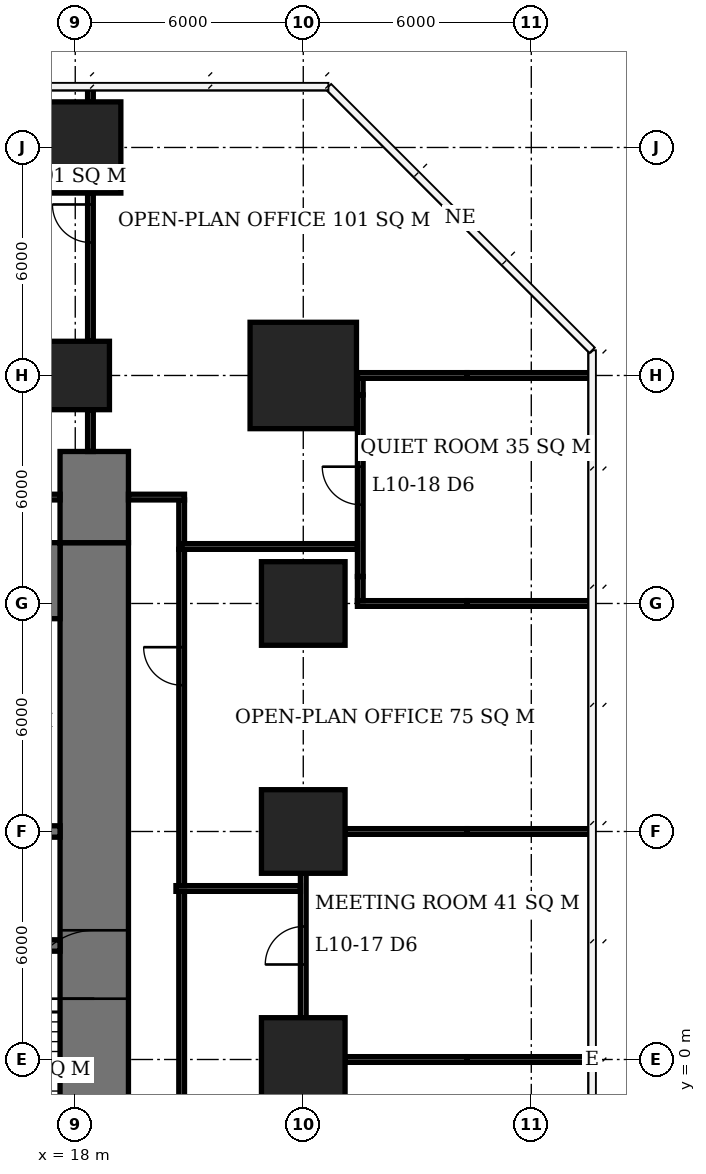
"""IFC4 building model, lengths in metres.
Left out: names, types, materials, properties, quantities, classifications, styles, units other than length and angle.
Written with IfcOpenShell. Run it as: python <this file> out.ifc"""

import sys

from ifc_helpers import new_model, si_unit, direction, frame, frame_2d, origin, origin_2d, place, context, subcontext, project, spatial, rectangle, extrude, element, fill, save


model = new_model("IFC4")
c1 = context("Model", 3, precision=1e-05, world=origin(), true_north=direction((0.0, 1.0)))
c2 = subcontext(c1, "Body", "Model", "MODEL_VIEW")
j1 = project(units=[si_unit("LENGTHUNIT", "METRE"), si_unit("PLANEANGLEUNIT", "RADIAN")], contexts=[c1])
p1 = place(None, origin())
s1 = spatial("IfcSite", under=j1, at=p1, CompositionType="ELEMENT")
p2 = place(p1, origin())
s2 = spatial("IfcBuilding", under=s1, at=p2, CompositionType="ELEMENT")
p3 = place(p2, frame((0.0, 0.0, 45.5)))
s3 = spatial("IfcBuildingStorey", under=s2, at=p3, CompositionType="ELEMENT", Elevation=45.5)
p4 = place(p3, frame((18.0, 18.0, 0.0), z_axis=(0.0, 0.0, 1.0), x_axis=(1.0, 0.0, 0.0)))
e1 = element("IfcColumn", 1, at=p4, inside=s3, PredefinedType="COLUMN", context=c2, shape_type="SweptSolid", body=[
    extrude(rectangle(XDim=1.8, YDim=1.8, at=origin_2d()), origin(), (0.0, 0.0, 1.0), 3.9),
])
p5 = place(p3, frame((18.0, 24.0, 0.0), z_axis=(0.0, 0.0, 1.0), x_axis=(1.0, 0.0, 0.0)))
e2 = element("IfcColumn", 2, at=p5, inside=s3, PredefinedType="COLUMN", context=c2, shape_type="SweptSolid", body=[
    extrude(rectangle(XDim=2.4, YDim=2.4, at=origin_2d()), origin(), (0.0, 0.0, 1.0), 3.9),
])
for number, where, z_axis, x_axis in (
    (3, (24.0, 0.0, 0.0), (0.0, 0.0, 1.0), (1.0, 0.0, 0.0)),
    (4, (24.0, 6.0, 0.0), (0.0, 0.0, 1.0), (1.0, 0.0, 0.0)),
    (5, (24.0, 12.0, 0.0), (0.0, 0.0, 1.0), (1.0, 0.0, 0.0)),
):
    element("IfcColumn", number, at=place(p3, frame(where, z_axis=z_axis, x_axis=x_axis)), inside=s3, PredefinedType="COLUMN", context=c2, shape_type="SweptSolid", body=[
        extrude(rectangle(XDim=2.2, YDim=2.2, at=origin_2d()), origin(), (0.0, 0.0, 1.0), 3.9),
    ])
p6 = place(p3, frame((24.0, 18.0, 0.0), z_axis=(0.0, 0.0, 1.0), x_axis=(1.0, 0.0, 0.0)))
e6 = element("IfcColumn", 6, at=p6, inside=s3, PredefinedType="COLUMN", context=c2, shape_type="SweptSolid", body=[
    extrude(rectangle(XDim=2.8, YDim=2.8, at=origin_2d()), origin(), (0.0, 0.0, 1.0), 3.9),
])
p7 = place(p3, frame((-5.6, 12.6, 0.0), z_axis=(0.0, 0.0, 1.0), x_axis=(1.0, 0.0, 0.0)))
e7 = element("IfcWall", 7, at=p7, inside=s3, PredefinedType="SHEAR", context=c2, shape_type="SweptSolid", body=[
    extrude(rectangle(XDim=23.2, YDim=2.0, at=frame_2d((11.6, 0.0))), origin(), (0.0, 0.0, 1.0), 3.9),
])
p8 = place(p3, frame((18.5, -7.6, 0.0), z_axis=(0.0, 0.0, 1.0), x_axis=(0.0, 1.0, 0.0)))
e8 = element("IfcWall", 8, at=p8, inside=s3, PredefinedType="SHEAR", context=c2, shape_type="SweptSolid", body=[
    extrude(rectangle(XDim=21.2, YDim=1.8, at=frame_2d((10.6, 0.0))), origin(), (0.0, 0.0, 1.0), 3.9),
])
p9 = place(p8, frame((9.2, 0.0, 0.0)))
e9 = element("IfcOpeningElement", 9, at=p9, cuts=e8, PredefinedType="OPENING", context=c2, shape_type="SweptSolid", body=[
    extrude(rectangle(XDim=1.8, YDim=2.4, at=frame_2d((0.9, 1.2))), frame((0.0, 0.91, 0.0), z_axis=(0.0, -1.0, 0.0), x_axis=(1.0, 0.0, 0.0)), (0.0, 0.0, 1.0), 1.82),
])
p10 = place(p3, frame((18.5, 13.6, 0.0), z_axis=(0.0, 0.0, 1.0), x_axis=(0.0, 1.0, 0.0)))
e10 = element("IfcWall", 10, at=p10, inside=s3, PredefinedType="SHEAR", context=c2, shape_type="SweptSolid", body=[
    extrude(rectangle(XDim=2.4, YDim=1.8, at=frame_2d((1.2, 0.0))), origin(), (0.0, 0.0, 1.0), 3.9),
])
p11 = place(p3, frame((12.15, 3.0, 0.0), z_axis=(0.0, 0.0, 1.0), x_axis=(1.0, 0.0, 0.0)))
e11 = element("IfcWall", 11, at=p11, inside=s3, PredefinedType="SHEAR", context=c2, shape_type="SweptSolid", body=[
    extrude(rectangle(XDim=5.45, YDim=0.3, at=frame_2d((2.725, 0.0))), origin(), (0.0, 0.0, 1.0), 3.9),
])
p12 = place(p11, frame((3.25, 0.0, 0.0)))
e12 = element("IfcOpeningElement", 12, at=p12, cuts=e11, PredefinedType="OPENING", context=c2, shape_type="SweptSolid", body=[
    extrude(rectangle(XDim=1.2, YDim=2.1, at=frame_2d((0.6, 1.05))), frame((0.0, 0.16, 0.0), z_axis=(0.0, -1.0, 0.0), x_axis=(1.0, 0.0, 0.0)), (0.0, 0.0, 1.0), 0.32),
])
p13 = place(p11, frame((0.45, 0.0, 0.0)))
e13 = element("IfcOpeningElement", 13, at=p13, cuts=e11, PredefinedType="OPENING", context=c2, shape_type="SweptSolid", body=[
    extrude(rectangle(XDim=0.9, YDim=2.1, at=frame_2d((0.45, 1.05))), frame((0.0, 0.16, 0.0), z_axis=(0.0, -1.0, 0.0), x_axis=(1.0, 0.0, 0.0)), (0.0, 0.0, 1.0), 0.32),
])
p14 = place(p3, frame((-0.15, 6.0, 0.0), z_axis=(0.0, 0.0, 1.0), x_axis=(1.0, 0.0, 0.0)))
e14 = element("IfcWall", 14, at=p14, inside=s3, PredefinedType="SHEAR", context=c2, shape_type="SweptSolid", body=[
    extrude(rectangle(XDim=17.75, YDim=0.3, at=frame_2d((8.875, 0.0))), origin(), (0.0, 0.0, 1.0), 3.9),
])
p15 = place(p14, frame((13.15, 0.0, 0.0)))
e15 = element("IfcOpeningElement", 15, at=p15, cuts=e14, PredefinedType="OPENING", context=c2, shape_type="SweptSolid", body=[
    extrude(rectangle(XDim=0.9, YDim=2.1, at=frame_2d((0.45, 1.05))), frame((0.0, 0.16, 0.0), z_axis=(0.0, -1.0, 0.0), x_axis=(1.0, 0.0, 0.0)), (0.0, 0.0, 1.0), 0.32),
])
p16 = place(p14, frame((1.1, 0.0, 0.0)))
e16 = element("IfcOpeningElement", 16, at=p16, cuts=e14, PredefinedType="OPENING", context=c2, shape_type="SweptSolid", body=[
    extrude(rectangle(XDim=1.1, YDim=2.1, at=frame_2d((0.55, 1.05))), frame((0.0, 0.16, 0.0), z_axis=(0.0, -1.0, 0.0), x_axis=(1.0, 0.0, 0.0)), (0.0, 0.0, 1.0), 0.32),
])
p17 = place(p14, frame((4.1, 0.0, 0.0)))
e17 = element("IfcOpeningElement", 17, at=p17, cuts=e14, PredefinedType="OPENING", context=c2, shape_type="SweptSolid", body=[
    extrude(rectangle(XDim=1.1, YDim=2.1, at=frame_2d((0.55, 1.05))), frame((0.0, 0.16, 0.0), z_axis=(0.0, -1.0, 0.0), x_axis=(1.0, 0.0, 0.0)), (0.0, 0.0, 1.0), 0.32),
])
p18 = place(p14, frame((7.1, 0.0, 0.0)))
e18 = element("IfcOpeningElement", 18, at=p18, cuts=e14, PredefinedType="OPENING", context=c2, shape_type="SweptSolid", body=[
    extrude(rectangle(XDim=1.1, YDim=2.1, at=frame_2d((0.55, 1.05))), frame((0.0, 0.16, 0.0), z_axis=(0.0, -1.0, 0.0), x_axis=(1.0, 0.0, 0.0)), (0.0, 0.0, 1.0), 0.32),
])
p19 = place(p14, frame((10.1, 0.0, 0.0)))
e19 = element("IfcOpeningElement", 19, at=p19, cuts=e14, PredefinedType="OPENING", context=c2, shape_type="SweptSolid", body=[
    extrude(rectangle(XDim=1.1, YDim=2.1, at=frame_2d((0.55, 1.05))), frame((0.0, 0.16, 0.0), z_axis=(0.0, -1.0, 0.0), x_axis=(1.0, 0.0, 0.0)), (0.0, 0.0, 1.0), 0.32),
])
p20 = place(p3, frame((25.1, 0.0, 0.0), z_axis=(0.0, 0.0, 1.0), x_axis=(1.0, 0.0, 0.0)))
e20 = element("IfcWall", 20, at=p20, inside=s3, PredefinedType="PARTITIONING", context=c2, shape_type="SweptSolid", body=[
    extrude(rectangle(XDim=3.21, YDim=0.15, at=frame_2d((1.605, 0.0))), origin(), (0.0, 0.0, 1.0), 2.65),
])
p21 = place(p3, frame((28.31, 0.0, 0.0), z_axis=(0.0, 0.0, 1.0), x_axis=(1.0, 0.0, 0.0)))
e21 = element("IfcWall", 21, at=p21, inside=s3, PredefinedType="PARTITIONING", context=c2, shape_type="SweptSolid", body=[
    extrude(rectangle(XDim=3.24, YDim=0.15, at=frame_2d((1.62, 0.0))), origin(), (0.0, 0.0, 1.0), 3.65),
])
p22 = place(p3, frame((25.1, 6.0, 0.0), z_axis=(0.0, 0.0, 1.0), x_axis=(1.0, 0.0, 0.0)))
e22 = element("IfcWall", 22, at=p22, inside=s3, PredefinedType="PARTITIONING", context=c2, shape_type="SweptSolid", body=[
    extrude(rectangle(XDim=3.21, YDim=0.15, at=frame_2d((1.605, 0.0))), origin(), (0.0, 0.0, 1.0), 2.65),
])
p23 = place(p3, frame((28.31, 6.0, 0.0), z_axis=(0.0, 0.0, 1.0), x_axis=(1.0, 0.0, 0.0)))
e23 = element("IfcWall", 23, at=p23, inside=s3, PredefinedType="PARTITIONING", context=c2, shape_type="SweptSolid", body=[
    extrude(rectangle(XDim=3.29, YDim=0.15, at=frame_2d((1.645, 0.0))), origin(), (0.0, 0.0, 1.0), 3.65),
])
p24 = place(p3, frame((25.425, 12.0, 0.0), z_axis=(0.0, 0.0, 1.0), x_axis=(1.0, 0.0, 0.0)))
e24 = element("IfcWall", 24, at=p24, inside=s3, PredefinedType="PARTITIONING", context=c2, shape_type="SweptSolid", body=[
    extrude(rectangle(XDim=2.885, YDim=0.15, at=frame_2d((1.442, 0.0))), origin(), (0.0, 0.0, 1.0), 2.65),
])
p25 = place(p3, frame((28.31, 12.0, 0.0), z_axis=(0.0, 0.0, 1.0), x_axis=(1.0, 0.0, 0.0)))
e25 = element("IfcWall", 25, at=p25, inside=s3, PredefinedType="PARTITIONING", context=c2, shape_type="SweptSolid", body=[
    extrude(rectangle(XDim=3.29, YDim=0.15, at=frame_2d((1.645, 0.0))), origin(), (0.0, 0.0, 1.0), 3.65),
])
p26 = place(p3, frame((25.425, 18.0, 0.0), z_axis=(0.0, 0.0, 1.0), x_axis=(1.0, 0.0, 0.0)))
e26 = element("IfcWall", 26, at=p26, inside=s3, PredefinedType="PARTITIONING", context=c2, shape_type="SweptSolid", body=[
    extrude(rectangle(XDim=2.885, YDim=0.15, at=frame_2d((1.442, 0.0))), origin(), (0.0, 0.0, 1.0), 2.65),
])
p27 = place(p3, frame((28.31, 18.0, 0.0), z_axis=(0.0, 0.0, 1.0), x_axis=(1.0, 0.0, 0.0)))
e27 = element("IfcWall", 27, at=p27, inside=s3, PredefinedType="PARTITIONING", context=c2, shape_type="SweptSolid", body=[
    extrude(rectangle(XDim=3.29, YDim=0.15, at=frame_2d((1.645, 0.0))), origin(), (0.0, 0.0, 1.0), 3.65),
])
p28 = place(p3, frame((24.0, 1.1, 0.0), z_axis=(0.0, 0.0, 1.0), x_axis=(0.0, 1.0, 0.0)))
e28 = element("IfcWall", 28, at=p28, inside=s3, PredefinedType="PARTITIONING", context=c2, shape_type="SweptSolid", body=[
    extrude(rectangle(XDim=3.8, YDim=0.15, at=frame_2d((1.9, 0.0))), origin(), (0.0, 0.0, 1.0), 3.65),
])
p29 = place(p28, frame((1.4, 0.0, 0.0)))
e29 = element("IfcOpeningElement", 29, at=p29, cuts=e28, PredefinedType="OPENING", context=c2, shape_type="SweptSolid", body=[
    extrude(rectangle(XDim=1.0, YDim=2.1, at=frame_2d((0.5, 1.05))), frame((0.0, 0.085, 0.0), z_axis=(0.0, -1.0, 0.0), x_axis=(1.0, 0.0, 0.0)), (0.0, 0.0, 1.0), 0.17),
])
p30 = place(p3, frame((25.5, 12.075, 0.0), z_axis=(0.0, 0.0, 1.0), x_axis=(0.0, 1.0, 0.0)))
e30 = element("IfcWall", 30, at=p30, inside=s3, PredefinedType="PARTITIONING", context=c2, shape_type="SweptSolid", body=[
    extrude(rectangle(XDim=0.635, YDim=0.15, at=frame_2d((0.317, 0.0))), origin(), (0.0, 0.0, 1.0), 2.65),
])
p31 = place(p3, frame((25.5, 12.71, 0.0), z_axis=(0.0, 0.0, 1.0), x_axis=(0.0, 1.0, 0.0)))
e31 = element("IfcWall", 31, at=p31, inside=s3, PredefinedType="PARTITIONING", context=c2, shape_type="SweptSolid", body=[
    extrude(rectangle(XDim=4.78, YDim=0.15, at=frame_2d((2.39, 0.0))), origin(), (0.0, 0.0, 1.0), 3.65),
])
p32 = place(p31, frame((1.89, 0.0, 0.0)))
e32 = element("IfcOpeningElement", 32, at=p32, cuts=e31, PredefinedType="OPENING", context=c2, shape_type="SweptSolid", body=[
    extrude(rectangle(XDim=1.0, YDim=2.1, at=frame_2d((0.5, 1.05))), frame((0.0, 0.085, 0.0), z_axis=(0.0, -1.0, 0.0), x_axis=(1.0, 0.0, 0.0)), (0.0, 0.0, 1.0), 0.17),
])
p33 = place(p3, frame((25.5, 17.49, 0.0), z_axis=(0.0, 0.0, 1.0), x_axis=(0.0, 1.0, 0.0)))
e33 = element("IfcWall", 33, at=p33, inside=s3, PredefinedType="PARTITIONING", context=c2, shape_type="SweptSolid", body=[
    extrude(rectangle(XDim=0.435, YDim=0.15, at=frame_2d((0.218, 0.0))), origin(), (0.0, 0.0, 1.0), 2.65),
])
p34 = place(p3, frame((-5.6, 14.8, 0.0), z_axis=(0.0, 0.0, 1.0), x_axis=(1.0, 0.0, 0.0)))
e34 = element("IfcWall", 34, at=p34, inside=s3, PredefinedType="PARTITIONING", context=c2, shape_type="SweptSolid", body=[
    extrude(rectangle(XDim=23.2, YDim=0.15, at=frame_2d((11.6, 0.0))), origin(), (0.0, 0.0, 1.0), 3.65),
])
p35 = place(p34, frame((14.58, 0.0, 0.0)))
e35 = element("IfcOpeningElement", 35, at=p35, cuts=e34, PredefinedType="OPENING", context=c2, shape_type="SweptSolid", body=[
    extrude(rectangle(XDim=1.0, YDim=2.1, at=frame_2d((0.5, 1.05))), frame((0.0, 0.085, 0.0), z_axis=(0.0, -1.0, 0.0), x_axis=(1.0, 0.0, 0.0)), (0.0, 0.0, 1.0), 0.17),
])
p36 = place(p3, frame((18.4, 16.0, 0.0), z_axis=(0.0, 0.0, 1.0), x_axis=(0.0, 1.0, 0.0)))
e36 = element("IfcWall", 36, at=p36, inside=s3, PredefinedType="PARTITIONING", context=c2, shape_type="SweptSolid", body=[
    extrude(rectangle(XDim=1.1, YDim=0.15, at=frame_2d((0.55, 0.0))), origin(), (0.0, 0.0, 1.0), 3.65),
])
p37 = place(p3, frame((18.4, 18.9, 0.0), z_axis=(0.0, 0.0, 1.0), x_axis=(0.0, 1.0, 0.0)))
e37 = element("IfcWall", 37, at=p37, inside=s3, PredefinedType="PARTITIONING", context=c2, shape_type="SweptSolid", body=[
    extrude(rectangle(XDim=3.9, YDim=0.15, at=frame_2d((1.95, 0.0))), origin(), (0.0, 0.0, 1.0), 3.65),
])
p38 = place(p37, frame((2.6, 0.0, 0.0)))
e38 = element("IfcOpeningElement", 38, at=p38, cuts=e37, PredefinedType="OPENING", context=c2, shape_type="SweptSolid", body=[
    extrude(rectangle(XDim=1.0, YDim=2.1, at=frame_2d((0.5, 1.05))), frame((0.0, 0.085, 0.0), z_axis=(0.0, -1.0, 0.0), x_axis=(1.0, 0.0, 0.0)), (0.0, 0.0, 1.0), 0.17),
])
p39 = place(p3, frame((18.4, 25.2, 0.0), z_axis=(0.0, 0.0, 1.0), x_axis=(0.0, 1.0, 0.0)))
e39 = element("IfcWall", 39, at=p39, inside=s3, PredefinedType="PARTITIONING", context=c2, shape_type="SweptSolid", body=[
    extrude(rectangle(XDim=0.35, YDim=0.15, at=frame_2d((0.175, 0.0))), origin(), (0.0, 0.0, 1.0), 3.65),
])
p40 = place(p3, frame((19.4, 14.8, 0.0), z_axis=(0.0, 0.0, 1.0), x_axis=(1.0, 0.0, 0.0)))
e40 = element("IfcWall", 40, at=p40, inside=s3, PredefinedType="PARTITIONING", context=c2, shape_type="SweptSolid", body=[
    extrude(rectangle(XDim=1.475, YDim=0.15, at=frame_2d((0.738, 0.0))), origin(), (0.0, 0.0, 1.0), 3.65),
])
p41 = place(p3, frame((20.8, -8.725, 0.0), z_axis=(0.0, 0.0, 1.0), x_axis=(0.0, 1.0, 0.0)))
e41 = element("IfcWall", 41, at=p41, inside=s3, PredefinedType="PARTITIONING", context=c2, shape_type="SweptSolid", body=[
    extrude(rectangle(XDim=13.15, YDim=0.15, at=frame_2d((6.575, 0.0))), origin(), (0.0, 0.0, 1.0), 3.65),
])
p42 = place(p41, frame((4.08, 0.0, 0.0)))
e42 = element("IfcOpeningElement", 42, at=p42, cuts=e41, PredefinedType="OPENING", context=c2, shape_type="SweptSolid", body=[
    extrude(rectangle(XDim=1.0, YDim=2.1, at=frame_2d((0.5, 1.05))), frame((0.0, 0.085, 0.0), z_axis=(0.0, -1.0, 0.0), x_axis=(1.0, 0.0, 0.0)), (0.0, 0.0, 1.0), 0.17),
])
p43 = place(p3, frame((20.8, 4.575, 0.0), z_axis=(0.0, 0.0, 1.0), x_axis=(0.0, 1.0, 0.0)))
e43 = element("IfcWall", 43, at=p43, inside=s3, PredefinedType="PARTITIONING", context=c2, shape_type="SweptSolid", body=[
    extrude(rectangle(XDim=8.85, YDim=0.15, at=frame_2d((4.425, 0.0))), origin(), (0.0, 0.0, 1.0), 3.65),
])
p44 = place(p43, frame((5.275, 0.0, 0.0)))
e44 = element("IfcOpeningElement", 44, at=p44, cuts=e43, PredefinedType="OPENING", context=c2, shape_type="SweptSolid", body=[
    extrude(rectangle(XDim=1.0, YDim=2.1, at=frame_2d((0.5, 1.05))), frame((0.0, 0.085, 0.0), z_axis=(0.0, -1.0, 0.0), x_axis=(1.0, 0.0, 0.0)), (0.0, 0.0, 1.0), 0.17),
])
p45 = place(p3, frame((20.65, 4.5, 0.0), z_axis=(0.0, 0.0, 1.0), x_axis=(1.0, 0.0, 0.0)))
e45 = element("IfcWall", 45, at=p45, inside=s3, PredefinedType="PARTITIONING", context=c2, shape_type="SweptSolid", body=[
    extrude(rectangle(XDim=3.275, YDim=0.15, at=frame_2d((1.638, 0.0))), origin(), (0.0, 0.0, 1.0), 3.65),
])
p46 = place(p3, frame((20.8, 13.425, 0.0), z_axis=(0.0, 0.0, 1.0), x_axis=(0.0, 1.0, 0.0)))
e46 = element("IfcWall", 46, at=p46, inside=s3, PredefinedType="PARTITIONING", context=c2, shape_type="SweptSolid", body=[
    extrude(rectangle(XDim=1.3, YDim=0.15, at=frame_2d((0.65, 0.0))), origin(), (0.0, 0.0, 1.0), 3.65),
])
p47 = place(p3, frame((20.8, 13.5, 0.0), z_axis=(0.0, 0.0, 1.0), x_axis=(1.0, 0.0, 0.0)))
e47 = element("IfcWall", 47, at=p47, inside=s3, PredefinedType="PARTITIONING", context=c2, shape_type="SweptSolid", body=[
    extrude(rectangle(XDim=4.625, YDim=0.15, at=frame_2d((2.312, 0.0))), origin(), (0.0, 0.0, 1.0), 3.65),
])
p48 = place(p9, origin())
e48 = element("IfcDoor", 48, at=p48, inside=s3, OperationType="DOUBLE_DOOR_SINGLE_SWING", PredefinedType="DOOR", context=c2, shape_type="SweptSolid", body=[
    extrude(rectangle(XDim=1.8, YDim=2.4, at=frame_2d((0.9, 1.2))), frame((0.0, 0.025, 0.0), z_axis=(0.0, -1.0, 0.0), x_axis=(1.0, 0.0, 0.0)), (0.0, 0.0, 1.0), 0.05),
])
fill(e9, e48)
p49 = place(p29, origin())
e49 = element("IfcDoor", 49, at=p49, inside=s3, OperationType="SINGLE_SWING_LEFT", PredefinedType="DOOR", context=c2, shape_type="SweptSolid", body=[
    extrude(rectangle(XDim=1.0, YDim=2.1, at=frame_2d((0.5, 1.05))), frame((0.0, 0.025, 0.0), z_axis=(0.0, -1.0, 0.0), x_axis=(1.0, 0.0, 0.0)), (0.0, 0.0, 1.0), 0.05),
])
fill(e29, e49)
p50 = place(p32, origin())
e50 = element("IfcDoor", 50, at=p50, inside=s3, OperationType="SINGLE_SWING_RIGHT", PredefinedType="DOOR", context=c2, shape_type="SweptSolid", body=[
    extrude(rectangle(XDim=1.0, YDim=2.1, at=frame_2d((0.5, 1.05))), frame((0.0, 0.025, 0.0), z_axis=(0.0, -1.0, 0.0), x_axis=(1.0, 0.0, 0.0)), (0.0, 0.0, 1.0), 0.05),
])
fill(e32, e50)
p51 = place(p44, origin())
e51 = element("IfcDoor", 51, at=p51, inside=s3, OperationType="SINGLE_SWING_RIGHT", PredefinedType="DOOR", context=c2, shape_type="SweptSolid", body=[
    extrude(rectangle(XDim=1.0, YDim=2.1, at=frame_2d((0.5, 1.05))), frame((0.0, 0.025, 0.0), z_axis=(0.0, -1.0, 0.0), x_axis=(1.0, 0.0, 0.0)), (0.0, 0.0, 1.0), 0.05),
])
fill(e44, e51)
p52 = place(p38, origin())
e52 = element("IfcDoor", 52, at=p52, inside=s3, OperationType="SINGLE_SWING_RIGHT", PredefinedType="DOOR", context=c2, shape_type="SweptSolid", body=[
    extrude(rectangle(XDim=1.0, YDim=2.1, at=frame_2d((0.5, 1.05))), frame((0.0, 0.025, 0.0), z_axis=(0.0, -1.0, 0.0), x_axis=(1.0, 0.0, 0.0)), (0.0, 0.0, 1.0), 0.05),
])
fill(e38, e52)
save(model, sys.argv[1])
